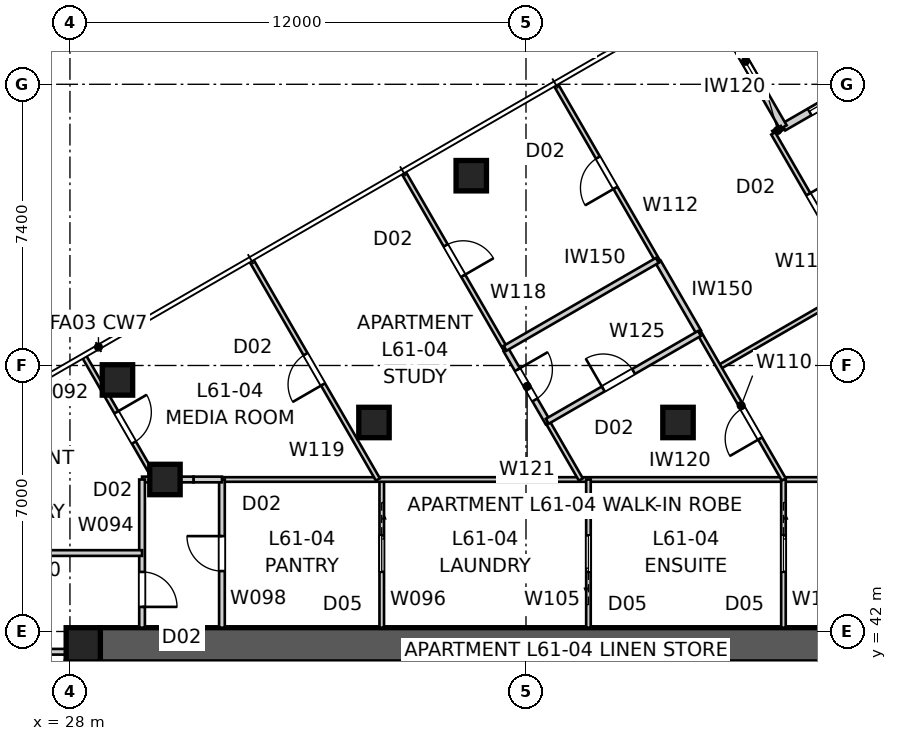
"""IFC4 building model, lengths in metres.
Left out: names, types, materials, properties, quantities, classifications, styles, units other than length and angle.
Written with IfcOpenShell. Run it as: python <this file> out.ifc"""

import sys

from ifc_helpers import new_model, si_unit, direction, frame, frame_2d, origin, origin_2d, place, context, subcontext, project, spatial, polyline, rectangle, outline, extrude, element, fill, save


model = new_model("IFC4")
c1 = context("Model", 3, precision=1e-05, world=origin(), true_north=direction((0.0, 1.0)))
c2 = subcontext(c1, "Body", "Model", "MODEL_VIEW")
j1 = project(units=[si_unit("LENGTHUNIT", "METRE"), si_unit("PLANEANGLEUNIT", "RADIAN")], contexts=[c1])
p1 = place(None, origin())
s1 = spatial("IfcSite", under=j1, at=p1, CompositionType="ELEMENT")
p2 = place(p1, origin())
s2 = spatial("IfcBuilding", under=s1, at=p2, CompositionType="ELEMENT")
p3 = place(p2, frame((0.0, 0.0, 221.8)))
s3 = spatial("IfcBuildingStorey", under=s2, at=p3, CompositionType="ELEMENT", Elevation=221.8)
p4 = place(p3, frame((28.8, 41.65, 0.0), z_axis=(0.0, 0.0, 1.0), x_axis=(1.0, 0.0, 0.0)))
e1 = element("IfcWall", 1, at=p4, inside=s3, PredefinedType="SHEAR", context=c2, shape_type="SweptSolid", body=[
    extrude(outline(polyline([(0.0, -0.45), (22.4, -0.45), (22.4, -0.025), (22.85, -0.025), (22.85, 0.025), (22.4, 0.025), (22.4, 0.45), (0.0, 0.45), (0.0, 0.025), (-0.45, 0.025), (-0.45, -0.025), (0.0, -0.025), (0.0, -0.45)])), origin(), (0.0, 0.0, 1.0), 3.4),
])
p5 = place(p3, frame((28.35, 41.2, 0.0), z_axis=(0.0, 0.0, 1.0), x_axis=(0.0, -1.0, 0.0)))
e2 = element("IfcWall", 2, at=p5, inside=s3, PredefinedType="SHEAR", context=c2, shape_type="SweptSolid", body=[
    extrude(outline(polyline([(0.0, -0.45), (22.4, -0.45), (22.4, -0.025), (22.85, -0.025), (22.85, 0.025), (22.4, 0.025), (22.4, 0.45), (0.0, 0.45), (0.0, 0.025), (-0.45, 0.025), (-0.45, -0.025), (0.0, -0.025), (0.0, -0.45)])), origin(), (0.0, 0.0, 1.0), 3.4),
])
p6 = place(p5, frame((11.14, 0.0, 0.0)))
e3 = element("IfcOpeningElement", 3, at=p6, cuts=e2, PredefinedType="OPENING", context=c2, shape_type="SweptSolid", body=[
    extrude(rectangle(XDim=1.02, YDim=2.4, at=frame_2d((0.51, 1.2))), frame((0.0, 0.46, 0.0), z_axis=(0.0, -1.0, 0.0), x_axis=(1.0, 0.0, 0.0)), (0.0, 0.0, 1.0), 0.92),
])
p7 = place(p3, frame((28.35, 41.65, 0.0), z_axis=(0.0, 0.0, 1.0), x_axis=(1.0, 0.0, 0.0)))
e4 = element("IfcColumn", 4, at=p7, inside=s3, PredefinedType="COLUMN", context=c2, shape_type="SweptSolid", body=[
    extrude(rectangle(XDim=0.9, YDim=0.9, at=origin_2d()), origin(), (0.0, 0.0, 1.0), 3.4),
])
for number, where, z_axis, x_axis in (
    (5, (38.56, 53.995, 0.0), (0.0, 0.0, 1.0), (1.0, 0.0, 0.0)),
    (6, (29.25, 48.62, 0.0), (0.0, 0.0, 1.0), (1.0, 0.0, 0.0)),
    (7, (44.0, 47.5, 0.0), (0.0, 0.0, 1.0), (1.0, 0.0, 0.0)),
    (8, (36.0, 47.5, 0.0), (0.0, 0.0, 1.0), (1.0, 0.0, 0.0)),
    (9, (30.5, 46.0, 0.0), (0.0, 0.0, 1.0), (1.0, 0.0, 0.0)),
):
    element("IfcColumn", number, at=place(p3, frame(where, z_axis=z_axis, x_axis=x_axis)), inside=s3, PredefinedType="COLUMN", context=c2, shape_type="SweptSolid", body=[
        extrude(rectangle(XDim=0.8, YDim=0.8, at=origin_2d()), origin(), (0.0, 0.0, 1.0), 3.4),
    ])
p8 = place(p3, frame((50.236, 57.271, 0.0), z_axis=(0.0, 0.0, 1.0), x_axis=(-0.866026010844, -0.49999894854, 0.0)))
e10 = element("IfcWall", 10, at=p8, inside=s3, PredefinedType="SOLIDWALL", context=c2, shape_type="SweptSolid", body=[
    extrude(rectangle(XDim=4.0, YDim=0.2, at=frame_2d((2.0, 0.0))), origin(), (0.0, 0.0, 1.0), 3.25),
])
p9 = place(p8, frame((0.8, 0.0, 0.0)))
e11 = element("IfcOpeningElement", 11, at=p9, cuts=e10, PredefinedType="OPENING", context=c2, shape_type="SweptSolid", body=[
    extrude(rectangle(XDim=2.4, YDim=2.1, at=frame_2d((1.2, 1.05))), frame((0.0, 0.11, 0.0), z_axis=(0.0, -1.0, 0.0), x_axis=(1.0, 0.0, 0.0)), (0.0, 0.0, 1.0), 0.22),
])
p10 = place(p3, frame((46.771, 55.271, 0.0), z_axis=(0.0, 0.0, 1.0), x_axis=(-0.49999894854, 0.866026010844, 0.0)))
e12 = element("IfcWall", 12, at=p10, inside=s3, PredefinedType="SOLIDWALL", context=c2, shape_type="SweptSolid", body=[
    extrude(rectangle(XDim=4.0, YDim=0.2, at=frame_2d((2.0, 0.0))), origin(), (0.0, 0.0, 1.0), 3.25),
])
p11 = place(p10, frame((1.0, 0.0, 0.45)))
e13 = element("IfcOpeningElement", 13, at=p11, cuts=e12, PredefinedType="OPENING", context=c2, shape_type="SweptSolid", body=[
    extrude(rectangle(XDim=2.0, YDim=1.8, at=frame_2d((1.0, 0.9))), frame((0.0, 0.11, 0.0), z_axis=(0.0, -1.0, 0.0), x_axis=(1.0, 0.0, 0.0)), (0.0, 0.0, 1.0), 0.22),
])
p12 = place(p3, frame((24.0, 41.467, 0.0), z_axis=(0.0, 0.0, 1.0), x_axis=(1.0, 0.0, 0.0)))
e14 = element("IfcWall", 14, at=p12, inside=s3, PredefinedType="SOLIDWALL", context=c2, shape_type="SweptSolid", body=[
    extrude(rectangle(XDim=4.82, YDim=0.15, at=frame_2d((2.41, 0.0))), origin(), (0.0, 0.0, 1.0), 3.25),
])
p13 = place(p12, frame((1.49, 0.0, 0.0)))
e15 = element("IfcOpeningElement", 15, at=p13, cuts=e14, PredefinedType="OPENING", context=c2, shape_type="SweptSolid", body=[
    extrude(rectangle(XDim=0.92, YDim=2.1, at=frame_2d((0.46, 1.05))), frame((0.0, 0.085, 0.0), z_axis=(0.0, -1.0, 0.0), x_axis=(1.0, 0.0, 0.0)), (0.0, 0.0, 1.0), 0.17),
])
p14 = place(p3, frame((28.38, 49.226, 0.0), z_axis=(0.0, 0.0, 1.0), x_axis=(0.499973989716, -0.866040420308, 0.0)))
e16 = element("IfcWall", 16, at=p14, inside=s3, PredefinedType="PARTITIONING", context=c2, shape_type="SweptSolid", body=[
    extrude(rectangle(XDim=3.725, YDim=0.12, at=frame_2d((1.862, 0.0))), origin(), (0.0, 0.0, 1.0), 3.25),
])
p15 = place(p14, frame((1.682, 0.0, 0.0)))
e17 = element("IfcOpeningElement", 17, at=p15, cuts=e16, PredefinedType="OPENING", context=c2, shape_type="SweptSolid", body=[
    extrude(rectangle(XDim=0.92, YDim=2.34, at=frame_2d((0.46, 1.17))), frame((0.0, 0.07, 0.0), z_axis=(0.0, -1.0, 0.0), x_axis=(1.0, 0.0, 0.0)), (0.0, 0.0, 1.0), 0.14),
])
p16 = place(p3, frame((30.633, 46.0, 0.0), z_axis=(0.0, 0.0, 1.0), x_axis=(-1.0, 0.0, 0.0)))
e18 = element("IfcWall", 18, at=p16, inside=s3, PredefinedType="SOLIDWALL", context=c2, shape_type="SweptSolid", body=[
    extrude(rectangle(XDim=0.735, YDim=0.15, at=frame_2d((0.368, 0.0))), origin(), (0.0, 0.0, 1.0), 3.25),
])
p17 = place(p3, frame((29.897, 46.0, 0.0), z_axis=(0.0, 0.0, 1.0), x_axis=(0.0, -1.0, 0.0)))
e19 = element("IfcWall", 19, at=p17, inside=s3, PredefinedType="SOLIDWALL", context=c2, shape_type="SweptSolid", body=[
    extrude(rectangle(XDim=3.9, YDim=0.15, at=frame_2d((1.95, 0.0))), origin(), (0.0, 0.0, 1.0), 3.25),
])
p18 = place(p17, frame((2.433, 0.0, 0.0)))
e20 = element("IfcOpeningElement", 20, at=p18, cuts=e19, PredefinedType="OPENING", context=c2, shape_type="SweptSolid", body=[
    extrude(rectangle(XDim=0.92, YDim=2.34, at=frame_2d((0.46, 1.17))), frame((0.0, 0.085, 0.0), z_axis=(0.0, -1.0, 0.0), x_axis=(1.0, 0.0, 0.0)), (0.0, 0.0, 1.0), 0.17),
])
p19 = place(p3, frame((29.897, 44.065, 0.0), z_axis=(0.0, 0.0, 1.0), x_axis=(-1.0, 0.0, 0.0)))
e21 = element("IfcWall", 21, at=p19, inside=s3, PredefinedType="SOLIDWALL", context=c2, shape_type="SweptSolid", body=[
    extrude(rectangle(XDim=5.897, YDim=0.15, at=frame_2d((2.949, 0.0))), origin(), (0.0, 0.0, 1.0), 3.25),
])
p20 = place(p3, frame((36.204, 46.0, 0.0), z_axis=(0.0, 0.0, 1.0), x_axis=(0.0, -1.0, 0.0)))
e22 = element("IfcWall", 22, at=p20, inside=s3, PredefinedType="PARTITIONING", context=c2, shape_type="SweptSolid", body=[
    extrude(rectangle(XDim=3.9, YDim=0.12, at=frame_2d((1.95, 0.0))), origin(), (0.0, 0.0, 1.0), 3.25),
])
p21 = place(p20, frame((1.47, 0.0, 0.0)))
e23 = element("IfcOpeningElement", 23, at=p21, cuts=e22, PredefinedType="OPENING", context=c2, shape_type="SweptSolid", body=[
    extrude(rectangle(XDim=0.96, YDim=2.1, at=frame_2d((0.48, 1.05))), frame((0.0, 0.07, 0.0), z_axis=(0.0, -1.0, 0.0), x_axis=(1.0, 0.0, 0.0)), (0.0, 0.0, 1.0), 0.14),
])
p22 = place(p3, frame((32.0, 46.0, 0.0), z_axis=(0.0, 0.0, 1.0), x_axis=(1.0, 0.0, 0.0)))
e24 = element("IfcWall", 24, at=p22, inside=s3, PredefinedType="PARTITIONING", context=c2, shape_type="SweptSolid", body=[
    extrude(rectangle(XDim=17.213, YDim=0.12, at=frame_2d((8.607, 0.0))), origin(), (0.0, 0.0, 1.0), 3.25),
])
p23 = place(p3, frame((32.0, 42.1, 0.0), z_axis=(0.0, 0.0, 1.0), x_axis=(0.0, 1.0, 0.0)))
e25 = element("IfcWall", 25, at=p23, inside=s3, PredefinedType="SOLIDWALL", context=c2, shape_type="SweptSolid", body=[
    extrude(rectangle(XDim=3.9, YDim=0.15, at=frame_2d((1.95, 0.0))), origin(), (0.0, 0.0, 1.0), 3.25),
])
p24 = place(p23, frame((1.49, 0.0, 0.0)))
e26 = element("IfcOpeningElement", 26, at=p24, cuts=e25, PredefinedType="OPENING", context=c2, shape_type="SweptSolid", body=[
    extrude(rectangle(XDim=0.92, YDim=2.34, at=frame_2d((0.46, 1.17))), frame((0.0, 0.085, 0.0), z_axis=(0.0, -1.0, 0.0), x_axis=(1.0, 0.0, 0.0)), (0.0, 0.0, 1.0), 0.17),
])
p25 = place(p3, frame((41.644, 42.1, 0.0), z_axis=(0.0, 0.0, 1.0), x_axis=(0.0, 1.0, 0.0)))
e27 = element("IfcWall", 27, at=p25, inside=s3, PredefinedType="PARTITIONING", context=c2, shape_type="SweptSolid", body=[
    extrude(rectangle(XDim=3.9, YDim=0.12, at=frame_2d((1.95, 0.0))), origin(), (0.0, 0.0, 1.0), 3.25),
])
p26 = place(p25, frame((1.47, 0.0, 0.0)))
e28 = element("IfcOpeningElement", 28, at=p26, cuts=e27, PredefinedType="OPENING", context=c2, shape_type="SweptSolid", body=[
    extrude(rectangle(XDim=0.96, YDim=2.1, at=frame_2d((0.48, 1.05))), frame((0.0, 0.07, 0.0), z_axis=(0.0, -1.0, 0.0), x_axis=(1.0, 0.0, 0.0)), (0.0, 0.0, 1.0), 0.14),
])
p27 = place(p3, frame((46.775, 46.0, 0.0), z_axis=(0.0, 0.0, 1.0), x_axis=(0.0, -1.0, 0.0)))
e29 = element("IfcWall", 29, at=p27, inside=s3, PredefinedType="PARTITIONING", context=c2, shape_type="SweptSolid", body=[
    extrude(rectangle(XDim=3.9, YDim=0.12, at=frame_2d((1.95, 0.0))), origin(), (0.0, 0.0, 1.0), 3.25),
])
p28 = place(p27, frame((1.47, 0.0, 0.0)))
e30 = element("IfcOpeningElement", 30, at=p28, cuts=e29, PredefinedType="OPENING", context=c2, shape_type="SweptSolid", body=[
    extrude(rectangle(XDim=0.96, YDim=2.1, at=frame_2d((0.48, 1.05))), frame((0.0, 0.07, 0.0), z_axis=(0.0, -1.0, 0.0), x_axis=(1.0, 0.0, 0.0)), (0.0, 0.0, 1.0), 0.14),
])
p29 = place(p3, frame((45.079, 48.954, 0.0), z_axis=(0.0, 0.0, 1.0), x_axis=(0.866025991751, 0.49999898161, 0.0)))
e31 = element("IfcWall", 31, at=p29, inside=s3, PredefinedType="PARTITIONING", context=c2, shape_type="SweptSolid", body=[
    extrude(rectangle(XDim=8.585, YDim=0.12, at=frame_2d((4.292, 0.0))), origin(), (0.0, 0.0, 1.0), 3.25),
])
p30 = place(p3, frame((46.784, 46.0, 0.0), z_axis=(0.0, 0.0, 1.0), x_axis=(-0.500017500808, 0.866015299452, 0.0)))
e32 = element("IfcWall", 32, at=p30, inside=s3, PredefinedType="PARTITIONING", context=c2, shape_type="SweptSolid", body=[
    extrude(rectangle(XDim=4.489, YDim=0.12, at=frame_2d((2.244, 0.0))), origin(), (0.0, 0.0, 1.0), 3.25),
])
p31 = place(p30, frame((1.245, 0.0, 0.0)))
e33 = element("IfcOpeningElement", 33, at=p31, cuts=e32, PredefinedType="OPENING", context=c2, shape_type="SweptSolid", body=[
    extrude(rectangle(XDim=0.92, YDim=2.34, at=frame_2d((0.46, 1.17))), frame((0.0, 0.07, 0.0), z_axis=(0.0, -1.0, 0.0), x_axis=(1.0, 0.0, 0.0)), (0.0, 0.0, 1.0), 0.14),
])
p32 = place(p3, frame((43.48, 51.722, 0.0), z_axis=(0.0, 0.0, 1.0), x_axis=(-0.499989180974, 0.866031650062, 0.0)))
e34 = element("IfcWall", 34, at=p32, inside=s3, PredefinedType="PARTITIONING", context=c2, shape_type="SweptSolid", body=[
    extrude(rectangle(XDim=5.388, YDim=0.12, at=frame_2d((2.694, 0.0))), origin(), (0.0, 0.0, 1.0), 3.25),
])
p33 = place(p32, frame((2.254, 0.0, 0.0)))
e35 = element("IfcOpeningElement", 35, at=p33, cuts=e34, PredefinedType="OPENING", context=c2, shape_type="SweptSolid", body=[
    extrude(rectangle(XDim=0.92, YDim=2.34, at=frame_2d((0.46, 1.17))), frame((0.0, 0.07, 0.0), z_axis=(0.0, -1.0, 0.0), x_axis=(1.0, 0.0, 0.0)), (0.0, 0.0, 1.0), 0.14),
])
p34 = place(p3, frame((46.737, 55.251, 0.0), z_axis=(0.0, 0.0, 1.0), x_axis=(-0.865829262097, -0.500339573586, 0.0)))
e36 = element("IfcWall", 36, at=p34, inside=s3, PredefinedType="PARTITIONING", context=c2, shape_type="SweptSolid", body=[
    extrude(rectangle(XDim=0.262, YDim=0.12, at=frame_2d((0.131, 0.0))), origin(), (0.0, 0.0, 1.0), 3.25),
])
p35 = place(p3, frame((46.506, 55.107, 0.0), z_axis=(0.0, 0.0, 1.0), x_axis=(0.49996820914, -0.866043757468, 0.0)))
e37 = element("IfcWall", 37, at=p35, inside=s3, PredefinedType="PARTITIONING", context=c2, shape_type="SweptSolid", body=[
    extrude(rectangle(XDim=4.615, YDim=0.12, at=frame_2d((2.308, 0.0))), origin(), (0.0, 0.0, 1.0), 3.25),
])
p36 = place(p35, frame((1.847, 0.0, 0.0)))
e38 = element("IfcOpeningElement", 38, at=p36, cuts=e37, PredefinedType="OPENING", context=c2, shape_type="SweptSolid", body=[
    extrude(rectangle(XDim=0.92, YDim=2.34, at=frame_2d((0.46, 1.17))), frame((0.0, 0.07, 0.0), z_axis=(0.0, -1.0, 0.0), x_axis=(1.0, 0.0, 0.0)), (0.0, 0.0, 1.0), 0.14),
])
p37 = place(p3, frame((44.54, 49.887, 0.0), z_axis=(0.0, 0.0, 1.0), x_axis=(-0.500005013853, 0.866022509016, 0.0)))
e39 = element("IfcWall", 39, at=p37, inside=s3, PredefinedType="SOLIDWALL", context=c2, shape_type="SweptSolid", body=[
    extrude(rectangle(XDim=2.119, YDim=0.15, at=frame_2d((1.06, 0.0))), origin(), (0.0, 0.0, 1.0), 3.25),
])
p38 = place(p3, frame((36.781, 54.076, 0.0), z_axis=(0.0, 0.0, 1.0), x_axis=(0.499989180974, -0.866031650062, 0.0)))
e40 = element("IfcWall", 40, at=p38, inside=s3, PredefinedType="PARTITIONING", context=c2, shape_type="SweptSolid", body=[
    extrude(rectangle(XDim=5.388, YDim=0.12, at=frame_2d((2.694, 0.0))), origin(), (0.0, 0.0, 1.0), 3.25),
])
p39 = place(p38, frame((2.214, 0.0, 0.0)))
e41 = element("IfcOpeningElement", 41, at=p39, cuts=e40, PredefinedType="OPENING", context=c2, shape_type="SweptSolid", body=[
    extrude(rectangle(XDim=0.92, YDim=2.34, at=frame_2d((0.46, 1.17))), frame((0.0, 0.07, 0.0), z_axis=(0.0, -1.0, 0.0), x_axis=(1.0, 0.0, 0.0)), (0.0, 0.0, 1.0), 0.14),
])
p40 = place(p3, frame((36.103, 46.0, 0.0), z_axis=(0.0, 0.0, 1.0), x_axis=(-0.500013541994, 0.866017585169, 0.0)))
e42 = element("IfcWall", 42, at=p40, inside=s3, PredefinedType="PARTITIONING", context=c2, shape_type="SweptSolid", body=[
    extrude(rectangle(XDim=6.655, YDim=0.12, at=frame_2d((3.328, 0.0))), origin(), (0.0, 0.0, 1.0), 3.25),
])
p41 = place(p40, frame((2.887, 0.0, 0.0)))
e43 = element("IfcOpeningElement", 43, at=p41, cuts=e42, PredefinedType="OPENING", context=c2, shape_type="SweptSolid", body=[
    extrude(rectangle(XDim=0.92, YDim=2.34, at=frame_2d((0.46, 1.17))), frame((0.0, 0.07, 0.0), z_axis=(0.0, -1.0, 0.0), x_axis=(1.0, 0.0, 0.0)), (0.0, 0.0, 1.0), 0.14),
])
p42 = place(p3, frame((40.584, 47.488, 0.0), z_axis=(0.0, 0.0, 1.0), x_axis=(0.500005339912, -0.866022320763, 0.0)))
e44 = element("IfcWall", 44, at=p42, inside=s3, PredefinedType="PARTITIONING", context=c2, shape_type="SweptSolid", body=[
    extrude(rectangle(XDim=1.718, YDim=0.12, at=frame_2d((0.859, 0.0))), origin(), (0.0, 0.0, 1.0), 3.25),
])
p43 = place(p3, frame((39.475, 49.41, 0.0), z_axis=(0.0, 0.0, 1.0), x_axis=(0.500008142102, -0.866020702889, 0.0)))
e45 = element("IfcWall", 45, at=p43, inside=s3, PredefinedType="SOLIDWALL", context=c2, shape_type="SweptSolid", body=[
    extrude(rectangle(XDim=2.219, YDim=0.15, at=frame_2d((1.11, 0.0))), origin(), (0.0, 0.0, 1.0), 3.25),
])
p44 = place(p43, frame((0.6, 0.0, 0.0)))
e46 = element("IfcOpeningElement", 46, at=p44, cuts=e45, PredefinedType="OPENING", context=c2, shape_type="SweptSolid", body=[
    extrude(rectangle(XDim=0.92, YDim=2.34, at=frame_2d((0.46, 1.17))), frame((0.0, 0.085, 0.0), z_axis=(0.0, -1.0, 0.0), x_axis=(1.0, 0.0, 0.0)), (0.0, 0.0, 1.0), 0.17),
])
p45 = place(p3, frame((43.455, 51.766, 0.0), z_axis=(0.0, 0.0, 1.0), x_axis=(-0.866025598446, -0.499999662836, 0.0)))
e47 = element("IfcWall", 47, at=p45, inside=s3, PredefinedType="SOLIDWALL", context=c2, shape_type="SweptSolid", body=[
    extrude(rectangle(XDim=4.625, YDim=0.15, at=frame_2d((2.312, 0.0))), origin(), (0.0, 0.0, 1.0), 3.25),
])
p46 = place(p3, frame((32.0, 46.0, 0.0), z_axis=(0.0, 0.0, 1.0), x_axis=(-1.0, 0.0, 0.0)))
e48 = element("IfcWall", 48, at=p46, inside=s3, PredefinedType="SOLIDWALL", context=c2, shape_type="SweptSolid", body=[
    extrude(rectangle(XDim=0.75, YDim=0.15, at=frame_2d((0.375, 0.0))), origin(), (0.0, 0.0, 1.0), 3.25),
])
p47 = place(p3, frame((31.25, 46.0, 0.0), z_axis=(0.0, 0.0, 1.0), x_axis=(-1.0, 0.0, 0.0)))
e49 = element("IfcWall", 49, at=p47, inside=s3, PredefinedType="SOLIDWALL", context=c2, shape_type="SweptSolid", body=[
    extrude(rectangle(XDim=0.545, YDim=0.15, at=frame_2d((0.273, 0.0))), origin(), (0.0, 0.0, 1.0), 2.55),
])
p48 = place(p3, frame((40.559, 47.531, 0.0), z_axis=(0.0, 0.0, 1.0), x_axis=(0.866025598446, 0.499999662836, 0.0)))
e50 = element("IfcWall", 50, at=p48, inside=s3, PredefinedType="SOLIDWALL", context=c2, shape_type="SweptSolid", body=[
    extrude(rectangle(XDim=4.625, YDim=0.15, at=frame_2d((2.312, 0.0))), origin(), (0.0, 0.0, 1.0), 3.25),
])
p49 = place(p48, frame((1.702, 0.0, 0.0)))
e51 = element("IfcOpeningElement", 51, at=p49, cuts=e50, PredefinedType="OPENING", context=c2, shape_type="SweptSolid", body=[
    extrude(rectangle(XDim=0.92, YDim=2.34, at=frame_2d((0.46, 1.17))), frame((0.0, 0.085, 0.0), z_axis=(0.0, -1.0, 0.0), x_axis=(1.0, 0.0, 0.0)), (0.0, 0.0, 1.0), 0.17),
])
p50 = place(p9, origin())
e52 = element("IfcDoor", 52, at=p50, inside=s3, OperationType="SLIDING_TO_LEFT", PredefinedType="DOOR", context=c2, shape_type="SweptSolid", body=[
    extrude(rectangle(XDim=2.4, YDim=2.1, at=frame_2d((1.2, 1.05))), frame((0.0, 0.025, 0.0), z_axis=(0.0, -1.0, 0.0), x_axis=(1.0, 0.0, 0.0)), (0.0, 0.0, 1.0), 0.05),
])
fill(e11, e52)
p51 = place(p11, origin())
e53 = element("IfcWindow", 53, at=p51, inside=s3, PartitioningType="SINGLE_PANEL", PredefinedType="WINDOW", context=c2, shape_type="SweptSolid", body=[
    extrude(rectangle(XDim=2.0, YDim=1.8, at=frame_2d((1.0, 0.9))), frame((0.0, 0.03, 0.0), z_axis=(0.0, -1.0, 0.0), x_axis=(1.0, 0.0, 0.0)), (0.0, 0.0, 1.0), 0.06),
])
fill(e13, e53)
p52 = place(p18, origin())
e54 = element("IfcDoor", 54, at=p52, inside=s3, OperationType="SINGLE_SWING_RIGHT", PredefinedType="DOOR", context=c2, shape_type="SweptSolid", body=[
    extrude(rectangle(XDim=0.92, YDim=2.34, at=frame_2d((0.46, 1.17))), frame((0.0, 0.025, 0.0), z_axis=(0.0, -1.0, 0.0), x_axis=(1.0, 0.0, 0.0)), (0.0, 0.0, 1.0), 0.05),
])
fill(e20, e54)
p53 = place(p15, origin())
e55 = element("IfcDoor", 55, at=p53, inside=s3, OperationType="SINGLE_SWING_LEFT", PredefinedType="DOOR", context=c2, shape_type="SweptSolid", body=[
    extrude(rectangle(XDim=0.92, YDim=2.34, at=frame_2d((0.46, 1.17))), frame((0.0, 0.025, 0.0), z_axis=(0.0, -1.0, 0.0), x_axis=(1.0, 0.0, 0.0)), (0.0, 0.0, 1.0), 0.05),
])
fill(e17, e55)
p54 = place(p24, origin())
e56 = element("IfcDoor", 56, at=p54, inside=s3, OperationType="SINGLE_SWING_RIGHT", PredefinedType="DOOR", context=c2, shape_type="SweptSolid", body=[
    extrude(rectangle(XDim=0.92, YDim=2.34, at=frame_2d((0.46, 1.17))), frame((0.0, 0.025, 0.0), z_axis=(0.0, -1.0, 0.0), x_axis=(1.0, 0.0, 0.0)), (0.0, 0.0, 1.0), 0.05),
])
fill(e26, e56)
p55 = place(p41, origin())
e57 = element("IfcDoor", 57, at=p55, inside=s3, OperationType="SINGLE_SWING_LEFT", PredefinedType="DOOR", context=c2, shape_type="SweptSolid", body=[
    extrude(rectangle(XDim=0.92, YDim=2.34, at=frame_2d((0.46, 1.17))), frame((0.0, 0.025, 0.0), z_axis=(0.0, -1.0, 0.0), x_axis=(1.0, 0.0, 0.0)), (0.0, 0.0, 1.0), 0.05),
])
fill(e43, e57)
p56 = place(p21, origin())
e58 = element("IfcDoor", 58, at=p56, inside=s3, OperationType="SLIDING_TO_LEFT", PredefinedType="DOOR", context=c2, shape_type="SweptSolid", body=[
    extrude(rectangle(XDim=0.96, YDim=2.1, at=frame_2d((0.48, 1.05))), frame((0.0, 0.025, 0.0), z_axis=(0.0, -1.0, 0.0), x_axis=(1.0, 0.0, 0.0)), (0.0, 0.0, 1.0), 0.05),
])
fill(e23, e58)
p57 = place(p39, origin())
e59 = element("IfcDoor", 59, at=p57, inside=s3, OperationType="SINGLE_SWING_RIGHT", PredefinedType="DOOR", context=c2, shape_type="SweptSolid", body=[
    extrude(rectangle(XDim=0.92, YDim=2.34, at=frame_2d((0.46, 1.17))), frame((0.0, 0.025, 0.0), z_axis=(0.0, -1.0, 0.0), x_axis=(1.0, 0.0, 0.0)), (0.0, 0.0, 1.0), 0.05),
])
fill(e41, e59)
p58 = place(p44, origin())
e60 = element("IfcDoor", 60, at=p58, inside=s3, OperationType="SINGLE_SWING_LEFT", PredefinedType="DOOR", context=c2, shape_type="SweptSolid", body=[
    extrude(rectangle(XDim=0.92, YDim=2.34, at=frame_2d((0.46, 1.17))), frame((0.0, 0.025, 0.0), z_axis=(0.0, -1.0, 0.0), x_axis=(1.0, 0.0, 0.0)), (0.0, 0.0, 1.0), 0.05),
])
fill(e46, e60)
p59 = place(p26, origin())
e61 = element("IfcDoor", 61, at=p59, inside=s3, OperationType="SLIDING_TO_LEFT", PredefinedType="DOOR", context=c2, shape_type="SweptSolid", body=[
    extrude(rectangle(XDim=0.96, YDim=2.1, at=frame_2d((0.48, 1.05))), frame((0.0, 0.025, 0.0), z_axis=(0.0, -1.0, 0.0), x_axis=(1.0, 0.0, 0.0)), (0.0, 0.0, 1.0), 0.05),
])
fill(e28, e61)
p60 = place(p33, origin())
e62 = element("IfcDoor", 62, at=p60, inside=s3, OperationType="SINGLE_SWING_LEFT", PredefinedType="DOOR", context=c2, shape_type="SweptSolid", body=[
    extrude(rectangle(XDim=0.92, YDim=2.34, at=frame_2d((0.46, 1.17))), frame((0.0, 0.025, 0.0), z_axis=(0.0, -1.0, 0.0), x_axis=(1.0, 0.0, 0.0)), (0.0, 0.0, 1.0), 0.05),
])
fill(e35, e62)
p61 = place(p49, origin())
e63 = element("IfcDoor", 63, at=p61, inside=s3, OperationType="SINGLE_SWING_LEFT", PredefinedType="DOOR", context=c2, shape_type="SweptSolid", body=[
    extrude(rectangle(XDim=0.92, YDim=2.34, at=frame_2d((0.46, 1.17))), frame((0.0, 0.025, 0.0), z_axis=(0.0, -1.0, 0.0), x_axis=(1.0, 0.0, 0.0)), (0.0, 0.0, 1.0), 0.05),
])
fill(e51, e63)
p62 = place(p28, origin())
e64 = element("IfcDoor", 64, at=p62, inside=s3, OperationType="SLIDING_TO_LEFT", PredefinedType="DOOR", context=c2, shape_type="SweptSolid", body=[
    extrude(rectangle(XDim=0.96, YDim=2.1, at=frame_2d((0.48, 1.05))), frame((0.0, 0.025, 0.0), z_axis=(0.0, -1.0, 0.0), x_axis=(1.0, 0.0, 0.0)), (0.0, 0.0, 1.0), 0.05),
])
fill(e30, e64)
p63 = place(p31, origin())
e65 = element("IfcDoor", 65, at=p63, inside=s3, OperationType="SINGLE_SWING_LEFT", PredefinedType="DOOR", context=c2, shape_type="SweptSolid", body=[
    extrude(rectangle(XDim=0.92, YDim=2.34, at=frame_2d((0.46, 1.17))), frame((0.0, 0.025, 0.0), z_axis=(0.0, -1.0, 0.0), x_axis=(1.0, 0.0, 0.0)), (0.0, 0.0, 1.0), 0.05),
])
fill(e33, e65)
p64 = place(p36, origin())
e66 = element("IfcDoor", 66, at=p64, inside=s3, OperationType="SINGLE_SWING_LEFT", PredefinedType="DOOR", context=c2, shape_type="SweptSolid", body=[
    extrude(rectangle(XDim=0.92, YDim=2.34, at=frame_2d((0.46, 1.17))), frame((0.0, 0.025, 0.0), z_axis=(0.0, -1.0, 0.0), x_axis=(1.0, 0.0, 0.0)), (0.0, 0.0, 1.0), 0.05),
])
fill(e38, e66)
save(model, sys.argv[1])
